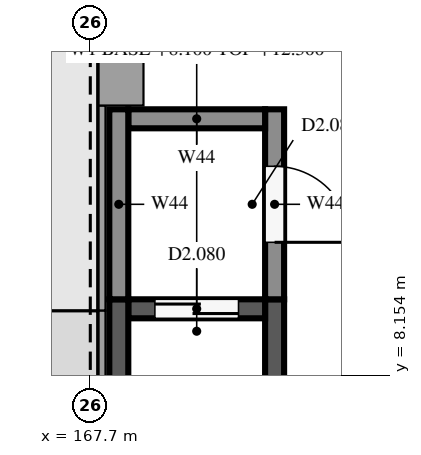
"""IFC4 building model, lengths in metres.
Left out: names, types, materials, properties, quantities, classifications, styles, units other than length and angle.
Written with IfcOpenShell. Run it as: python <this file> out.ifc"""

import sys

from ifc_helpers import new_model, si_unit, direction, frame, frame_2d, origin, place, context, subcontext, project, spatial, rectangle, extrude, element, fill, save


model = new_model("IFC4")
c1 = context("Model", 3, precision=1e-05, world=origin(), true_north=direction((0.0, 1.0)))
c2 = subcontext(c1, "Body", "Model", "MODEL_VIEW")
j1 = project(units=[si_unit("LENGTHUNIT", "METRE"), si_unit("PLANEANGLEUNIT", "RADIAN")], contexts=[c1])
p1 = place(None, origin())
s1 = spatial("IfcSite", under=j1, at=p1, CompositionType="ELEMENT")
p2 = place(p1, origin())
s2 = spatial("IfcBuilding", under=s1, at=p2, CompositionType="ELEMENT")
p3 = place(p2, frame((0.0, 0.0, 8.1)))
s3 = spatial("IfcBuildingStorey", under=s2, at=p3, CompositionType="ELEMENT", Elevation=8.1)
for number, where, z_axis, x_axis in (
    (1, (168.075, 6.25, 0.0), (0.0, 0.0, 1.0), (0.0, 1.0, 0.0)),
    (2, (170.125, 6.25, 0.0), (0.0, 0.0, 1.0), (0.0, 1.0, 0.0)),
):
    element("IfcWall", number, at=place(p3, frame(where, z_axis=z_axis, x_axis=x_axis)), inside=s3, PredefinedType="SHEAR", context=c2, shape_type="SweptSolid", body=[
        extrude(rectangle(XDim=2.9, YDim=0.25, at=frame_2d((1.45, 0.0))), origin(), (0.0, 0.0, 1.0), 4.2),
    ])
p4 = place(p3, frame((168.2, 9.025, 0.0), z_axis=(0.0, 0.0, 1.0), x_axis=(1.0, 0.0, 0.0)))
e3 = element("IfcWall", 3, at=p4, inside=s3, PredefinedType="SHEAR", context=c2, shape_type="SweptSolid", body=[
    extrude(rectangle(XDim=1.8, YDim=0.25, at=frame_2d((0.9, 0.0))), origin(), (0.0, 0.0, 1.0), 4.2),
])
p5 = place(p4, frame((0.35, 0.0, 0.0)))
e4 = element("IfcOpeningElement", 4, at=p5, cuts=e3, PredefinedType="OPENING", context=c2, shape_type="SweptSolid", body=[
    extrude(rectangle(XDim=1.1, YDim=2.1, at=frame_2d((0.55, 1.05))), frame((0.0, 0.135, 0.0), z_axis=(0.0, -1.0, 0.0), x_axis=(1.0, 0.0, 0.0)), (0.0, 0.0, 1.0), 0.27),
])
p6 = place(p3, frame((168.075, 9.15, 0.0), z_axis=(0.0, 0.0, 1.0), x_axis=(0.0, 1.0, 0.0)))
e5 = element("IfcWall", 5, at=p6, inside=s3, PredefinedType="SOLIDWALL", context=c2, shape_type="SweptSolid", body=[
    extrude(rectangle(XDim=2.5, YDim=0.25, at=frame_2d((1.25, 0.0))), origin(), (0.0, 0.0, 1.0), 4.2),
])
p7 = place(p3, frame((170.125, 11.65, 0.0), z_axis=(0.0, 0.0, 1.0), x_axis=(0.0, -1.0, 0.0)))
e6 = element("IfcWall", 6, at=p7, inside=s3, PredefinedType="SOLIDWALL", context=c2, shape_type="SweptSolid", body=[
    extrude(rectangle(XDim=2.5, YDim=0.25, at=frame_2d((1.25, 0.0))), origin(), (0.0, 0.0, 1.0), 4.2),
])
p8 = place(p7, frame((0.75, 0.0, 0.0)))
e7 = element("IfcOpeningElement", 7, at=p8, cuts=e6, PredefinedType="OPENING", context=c2, shape_type="SweptSolid", body=[
    extrude(rectangle(XDim=1.0, YDim=2.1, at=frame_2d((0.5, 1.05))), frame((0.0, 0.135, 0.0), z_axis=(0.0, -1.0, 0.0), x_axis=(1.0, 0.0, 0.0)), (0.0, 0.0, 1.0), 0.27),
])
p9 = place(p3, frame((168.2, 11.525, 0.0), z_axis=(0.0, 0.0, 1.0), x_axis=(1.0, 0.0, 0.0)))
e8 = element("IfcWall", 8, at=p9, inside=s3, PredefinedType="SOLIDWALL", context=c2, shape_type="SweptSolid", body=[
    extrude(rectangle(XDim=1.8, YDim=0.25, at=frame_2d((0.9, 0.0))), origin(), (0.0, 0.0, 1.0), 4.2),
])
p10 = place(p8, origin())
e9 = element("IfcDoor", 9, at=p10, inside=s3, OperationType="SINGLE_SWING_RIGHT", PredefinedType="DOOR", context=c2, shape_type="SweptSolid", body=[
    extrude(rectangle(XDim=1.0, YDim=2.1, at=frame_2d((0.5, 1.05))), frame((0.0, 0.025, 0.0), z_axis=(0.0, -1.0, 0.0), x_axis=(1.0, 0.0, 0.0)), (0.0, 0.0, 1.0), 0.05),
])
fill(e7, e9)
p11 = place(p5, origin())
e10 = element("IfcDoor", 10, at=p11, inside=s3, OperationType="SLIDING_TO_LEFT", PredefinedType="DOOR", context=c2, shape_type="SweptSolid", body=[
    extrude(rectangle(XDim=1.1, YDim=2.1, at=frame_2d((0.55, 1.05))), frame((0.0, 0.025, 0.0), z_axis=(0.0, -1.0, 0.0), x_axis=(1.0, 0.0, 0.0)), (0.0, 0.0, 1.0), 0.05),
])
fill(e4, e10)
save(model, sys.argv[1])
